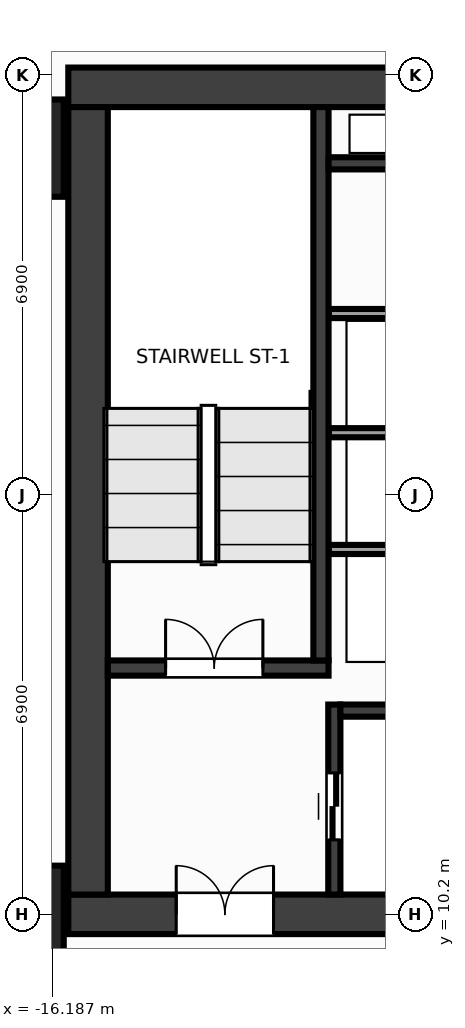
"""IFC4 building model, lengths in metres.
Left out: names, types, materials, properties, quantities, classifications, styles, units other than length and angle.
Written with IfcOpenShell. Run it as: python <this file> out.ifc"""

import sys

from ifc_helpers import new_model, si_unit, direction, frame, frame_2d, origin, origin_2d, place, context, subcontext, project, spatial, rectangle, extrude, source, transform, mapped, element, fill, save


model = new_model("IFC4")
c1 = context("Model", 3, precision=1e-05, world=origin(), true_north=direction((0.0, 1.0)))
c2 = subcontext(c1, "Body", "Model", "MODEL_VIEW")
j1 = project(units=[si_unit("LENGTHUNIT", "METRE"), si_unit("PLANEANGLEUNIT", "RADIAN")], contexts=[c1])
p1 = place(None, origin())
s1 = spatial("IfcSite", under=j1, at=p1, CompositionType="ELEMENT")
p2 = place(p1, origin())
s2 = spatial("IfcBuilding", under=s1, at=p2, CompositionType="ELEMENT")
p3 = place(p2, frame((0.0, 0.0, 185.6)))
s3 = spatial("IfcBuildingStorey", under=s2, at=p3, CompositionType="ELEMENT", Elevation=185.6)
m1 = source(origin(), c2, "Body", "SweptSolid", [
    extrude(rectangle(XDim=31.85, YDim=0.65, at=frame_2d((15.925, 0.0))), origin(), (0.0, 0.0, 1.0), 3.6),
])
p4 = place(p3, frame((-15.925, 23.8, 0.0), z_axis=(0.0, 0.0, 1.0), x_axis=(1.0, 0.0, 0.0)))
e1 = element("IfcWall", 1, at=p4, inside=s3, PredefinedType="SHEAR", context=c2, shape_type="MappedRepresentation", body=[
    mapped(m1, transform((0.0, 0.0, 0.0), x_axis=(1.0, 0.0, 0.0), y_axis=(0.0, 1.0, 0.0), z_axis=(0.0, 0.0, 1.0), scale=1.0)),
])
p5 = place(p3, frame((-15.925, 10.2, 0.0), z_axis=(0.0, 0.0, 1.0), x_axis=(1.0, 0.0, 0.0)))
e2 = element("IfcWall", 2, at=p5, inside=s3, PredefinedType="SHEAR", context=c2, shape_type="MappedRepresentation", body=[
    mapped(m1, transform((0.0, 0.0, 0.0), x_axis=(1.0, 0.0, 0.0), y_axis=(0.0, 1.0, 0.0), z_axis=(0.0, 0.0, 1.0), scale=1.0)),
])
p6 = place(p5, frame((1.775, 0.0, 0.0)))
e3 = element("IfcOpeningElement", 3, at=p6, cuts=e2, PredefinedType="OPENING", context=c2, shape_type="SweptSolid", body=[
    extrude(rectangle(XDim=1.6, YDim=2.15, at=frame_2d((0.8, 1.075))), frame((0.0, 0.337, 0.0), z_axis=(0.0, -1.0, 0.0), x_axis=(1.0, 0.0, 0.0)), (0.0, 0.0, 1.0), 0.674),
])
p7 = place(p5, frame((28.475, 0.0, 0.0)))
e4 = element("IfcOpeningElement", 4, at=p7, cuts=e2, PredefinedType="OPENING", context=c2, shape_type="SweptSolid", body=[
    extrude(rectangle(XDim=1.6, YDim=2.15, at=frame_2d((0.8, 1.075))), frame((0.0, 0.337, 0.0), z_axis=(0.0, -1.0, 0.0), x_axis=(1.0, 0.0, 0.0)), (0.0, 0.0, 1.0), 0.674),
])
p8 = place(p5, frame((15.175, 0.0, 0.0)))
e5 = element("IfcOpeningElement", 5, at=p8, cuts=e2, PredefinedType="OPENING", context=c2, shape_type="SweptSolid", body=[
    extrude(rectangle(XDim=1.5, YDim=2.2, at=frame_2d((0.75, 1.1))), frame((0.0, 0.337, 0.0), z_axis=(0.0, -1.0, 0.0), x_axis=(1.0, 0.0, 0.0)), (0.0, 0.0, 1.0), 0.674),
])
m2 = source(origin(), c2, "Body", "SweptSolid", [
    extrude(rectangle(XDim=12.95, YDim=0.65, at=frame_2d((6.475, 0.0))), origin(), (0.0, 0.0, 1.0), 3.6),
])
p9 = place(p3, frame((-15.6, 10.525, 0.0), z_axis=(0.0, 0.0, 1.0), x_axis=(0.0, 1.0, 0.0)))
e6 = element("IfcWall", 6, at=p9, inside=s3, PredefinedType="SHEAR", context=c2, shape_type="MappedRepresentation", body=[
    mapped(m2, transform((0.0, 0.0, 0.0), x_axis=(1.0, 0.0, 0.0), y_axis=(0.0, 1.0, 0.0), z_axis=(0.0, 0.0, 1.0), scale=1.0)),
])
m3 = source(origin(), c2, "Body", "SweptSolid", [
    extrude(rectangle(XDim=3.63, YDim=0.25, at=frame_2d((1.815, 0.0))), origin(), (0.0, 0.0, 1.0), 3.6),
])
p10 = place(p3, frame((-15.275, 14.25, 0.0), z_axis=(0.0, 0.0, 1.0), x_axis=(1.0, 0.0, 0.0)))
e7 = element("IfcWall", 7, at=p10, inside=s3, PredefinedType="SHEAR", context=c2, shape_type="MappedRepresentation", body=[
    mapped(m3, transform((0.0, 0.0, 0.0), x_axis=(1.0, 0.0, 0.0), y_axis=(0.0, 1.0, 0.0), z_axis=(0.0, 0.0, 1.0), scale=1.0)),
])
p11 = place(p10, frame((0.95, 0.0, 0.0)))
e8 = element("IfcOpeningElement", 8, at=p11, cuts=e7, PredefinedType="OPENING", context=c2, shape_type="SweptSolid", body=[
    extrude(rectangle(XDim=1.6, YDim=2.15, at=frame_2d((0.8, 1.075))), frame((0.0, 0.137, 0.0), z_axis=(0.0, -1.0, 0.0), x_axis=(1.0, 0.0, 0.0)), (0.0, 0.0, 1.0), 0.274),
])
m4 = source(origin(), c2, "Body", "SweptSolid", [
    extrude(rectangle(XDim=9.1, YDim=0.25, at=frame_2d((4.55, 0.0))), origin(), (0.0, 0.0, 1.0), 3.6),
])
p12 = place(p3, frame((-11.77, 14.375, 0.0), z_axis=(0.0, 0.0, 1.0), x_axis=(0.0, 1.0, 0.0)))
e9 = element("IfcWall", 9, at=p12, inside=s3, PredefinedType="SHEAR", context=c2, shape_type="MappedRepresentation", body=[
    mapped(m4, transform((0.0, 0.0, 0.0), x_axis=(1.0, 0.0, 0.0), y_axis=(0.0, 1.0, 0.0), z_axis=(0.0, 0.0, 1.0), scale=1.0)),
])
m5 = source(origin(), c2, "Body", "SweptSolid", [
    extrude(rectangle(XDim=3.125, YDim=0.2, at=frame_2d((1.562, 0.0))), origin(), (0.0, 0.0, 1.0), 3.6),
])
p13 = place(p3, frame((-11.55, 10.525, 0.0), z_axis=(0.0, 0.0, 1.0), x_axis=(0.0, 1.0, 0.0)))
e10 = element("IfcWall", 10, at=p13, inside=s3, PredefinedType="SHEAR", context=c2, shape_type="MappedRepresentation", body=[
    mapped(m5, transform((0.0, 0.0, 0.0), x_axis=(1.0, 0.0, 0.0), y_axis=(0.0, 1.0, 0.0), z_axis=(0.0, 0.0, 1.0), scale=1.0)),
])
p14 = place(p13, frame((0.9, 0.0, 0.0)))
e11 = element("IfcOpeningElement", 11, at=p14, cuts=e10, PredefinedType="OPENING", context=c2, shape_type="SweptSolid", body=[
    extrude(rectangle(XDim=1.1, YDim=2.15, at=frame_2d((0.55, 1.075))), frame((0.0, 0.112, 0.0), z_axis=(0.0, -1.0, 0.0), x_axis=(1.0, 0.0, 0.0)), (0.0, 0.0, 1.0), 0.224),
])
m6 = source(origin(), c2, "Body", "SweptSolid", [
    extrude(rectangle(XDim=2.825, YDim=0.2, at=frame_2d((1.413, 0.0))), origin(), (0.0, 0.0, 1.0), 3.6),
])
p15 = place(p3, frame((-11.45, 13.55, 0.0), z_axis=(0.0, 0.0, 1.0), x_axis=(1.0, 0.0, 0.0)))
e12 = element("IfcWall", 12, at=p15, inside=s3, PredefinedType="SHEAR", context=c2, shape_type="MappedRepresentation", body=[
    mapped(m6, transform((0.0, 0.0, 0.0), x_axis=(1.0, 0.0, 0.0), y_axis=(0.0, 1.0, 0.0), z_axis=(0.0, 0.0, 1.0), scale=1.0)),
])
m7 = source(origin(), c2, "Body", "SweptSolid", [
    extrude(rectangle(XDim=3.02, YDim=0.2, at=frame_2d((1.51, 0.0))), origin(), (0.0, 0.0, 1.0), 3.6),
])
p16 = place(p3, frame((-11.645, 22.55, 0.0), z_axis=(0.0, 0.0, 1.0), x_axis=(1.0, 0.0, 0.0)))
e13 = element("IfcWall", 13, at=p16, inside=s3, PredefinedType="SHEAR", context=c2, shape_type="MappedRepresentation", body=[
    mapped(m7, transform((0.0, 0.0, 0.0), x_axis=(1.0, 0.0, 0.0), y_axis=(0.0, 1.0, 0.0), z_axis=(0.0, 0.0, 1.0), scale=1.0)),
])
m8 = source(origin(), c2, "Body", "SweptSolid", [
    extrude(rectangle(XDim=1.6, YDim=1.6, at=origin_2d()), origin(), (0.0, 0.0, 1.0), 3.6),
])
for number, where, z_axis, x_axis in (
    (14, (-16.8, 10.2, 0.0), (0.0, 0.0, 1.0), (1.0, 0.0, 0.0)),
    (15, (-16.8, 22.8, 0.0), (0.0, 0.0, 1.0), (1.0, 0.0, 0.0)),
):
    element("IfcColumn", number, at=place(p3, frame(where, z_axis=z_axis, x_axis=x_axis)), inside=s3, PredefinedType="COLUMN", context=c2, shape_type="MappedRepresentation", body=[
        mapped(m8, transform((0.0, 0.0, 0.0), x_axis=(1.0, 0.0, 0.0), y_axis=(0.0, 1.0, 0.0), z_axis=(0.0, 0.0, 1.0), scale=1.0)),
    ])
m9 = source(origin(), c2, "Body", "SweptSolid", [
    extrude(rectangle(XDim=3.01, YDim=0.15, at=frame_2d((1.505, 0.0))), origin(), (0.0, 0.0, 1.0), 3.3),
])
for number, where, z_axis, x_axis in (
    (16, (-11.64, 16.2, 0.0), (0.0, 0.0, 1.0), (1.0, 0.0, 0.0)),
    (17, (-11.64, 18.12, 0.0), (0.0, 0.0, 1.0), (1.0, 0.0, 0.0)),
    (18, (-11.64, 20.08, 0.0), (0.0, 0.0, 1.0), (1.0, 0.0, 0.0)),
):
    element("IfcWall", number, at=place(p3, frame(where, z_axis=z_axis, x_axis=x_axis)), inside=s3, PredefinedType="PARTITIONING", context=c2, shape_type="MappedRepresentation", body=[
        mapped(m9, transform((0.0, 0.0, 0.0), x_axis=(1.0, 0.0, 0.0), y_axis=(0.0, 1.0, 0.0), z_axis=(0.0, 0.0, 1.0), scale=1.0)),
    ])
m10 = source(origin(), c2, "Body", "SweptSolid", [
    extrude(rectangle(XDim=1.6, YDim=2.15, at=frame_2d((0.8, 1.075))), frame((0.0, 0.025, 0.0), z_axis=(0.0, -1.0, 0.0), x_axis=(1.0, 0.0, 0.0)), (0.0, 0.0, 1.0), 0.05),
])
p17 = place(p11, origin())
e19 = element("IfcDoor", 19, at=p17, inside=s3, OperationType="DOUBLE_DOOR_SINGLE_SWING", PredefinedType="DOOR", context=c2, shape_type="MappedRepresentation", body=[
    mapped(m10, transform((0.0, 0.0, 0.0), x_axis=(1.0, 0.0, 0.0), y_axis=(0.0, 1.0, 0.0), z_axis=(0.0, 0.0, 1.0), scale=1.0)),
])
fill(e8, e19)
p18 = place(p6, origin())
e20 = element("IfcDoor", 20, at=p18, inside=s3, OperationType="DOUBLE_DOOR_SINGLE_SWING", PredefinedType="DOOR", context=c2, shape_type="MappedRepresentation", body=[
    mapped(m10, transform((0.0, 0.0, 0.0), x_axis=(1.0, 0.0, 0.0), y_axis=(0.0, 1.0, 0.0), z_axis=(0.0, 0.0, 1.0), scale=1.0)),
])
fill(e3, e20)
m11 = source(origin(), c2, "Body", "SweptSolid", [
    extrude(rectangle(XDim=1.1, YDim=2.15, at=frame_2d((0.55, 1.075))), frame((0.0, 0.025, 0.0), z_axis=(0.0, -1.0, 0.0), x_axis=(1.0, 0.0, 0.0)), (0.0, 0.0, 1.0), 0.05),
])
p19 = place(p14, origin())
e21 = element("IfcDoor", 21, at=p19, inside=s3, OperationType="DOUBLE_DOOR_SLIDING", PredefinedType="DOOR", context=c2, shape_type="MappedRepresentation", body=[
    mapped(m11, transform((0.0, 0.0, 0.0), x_axis=(1.0, 0.0, 0.0), y_axis=(0.0, 1.0, 0.0), z_axis=(0.0, 0.0, 1.0), scale=1.0)),
])
fill(e11, e21)
save(model, sys.argv[1])
